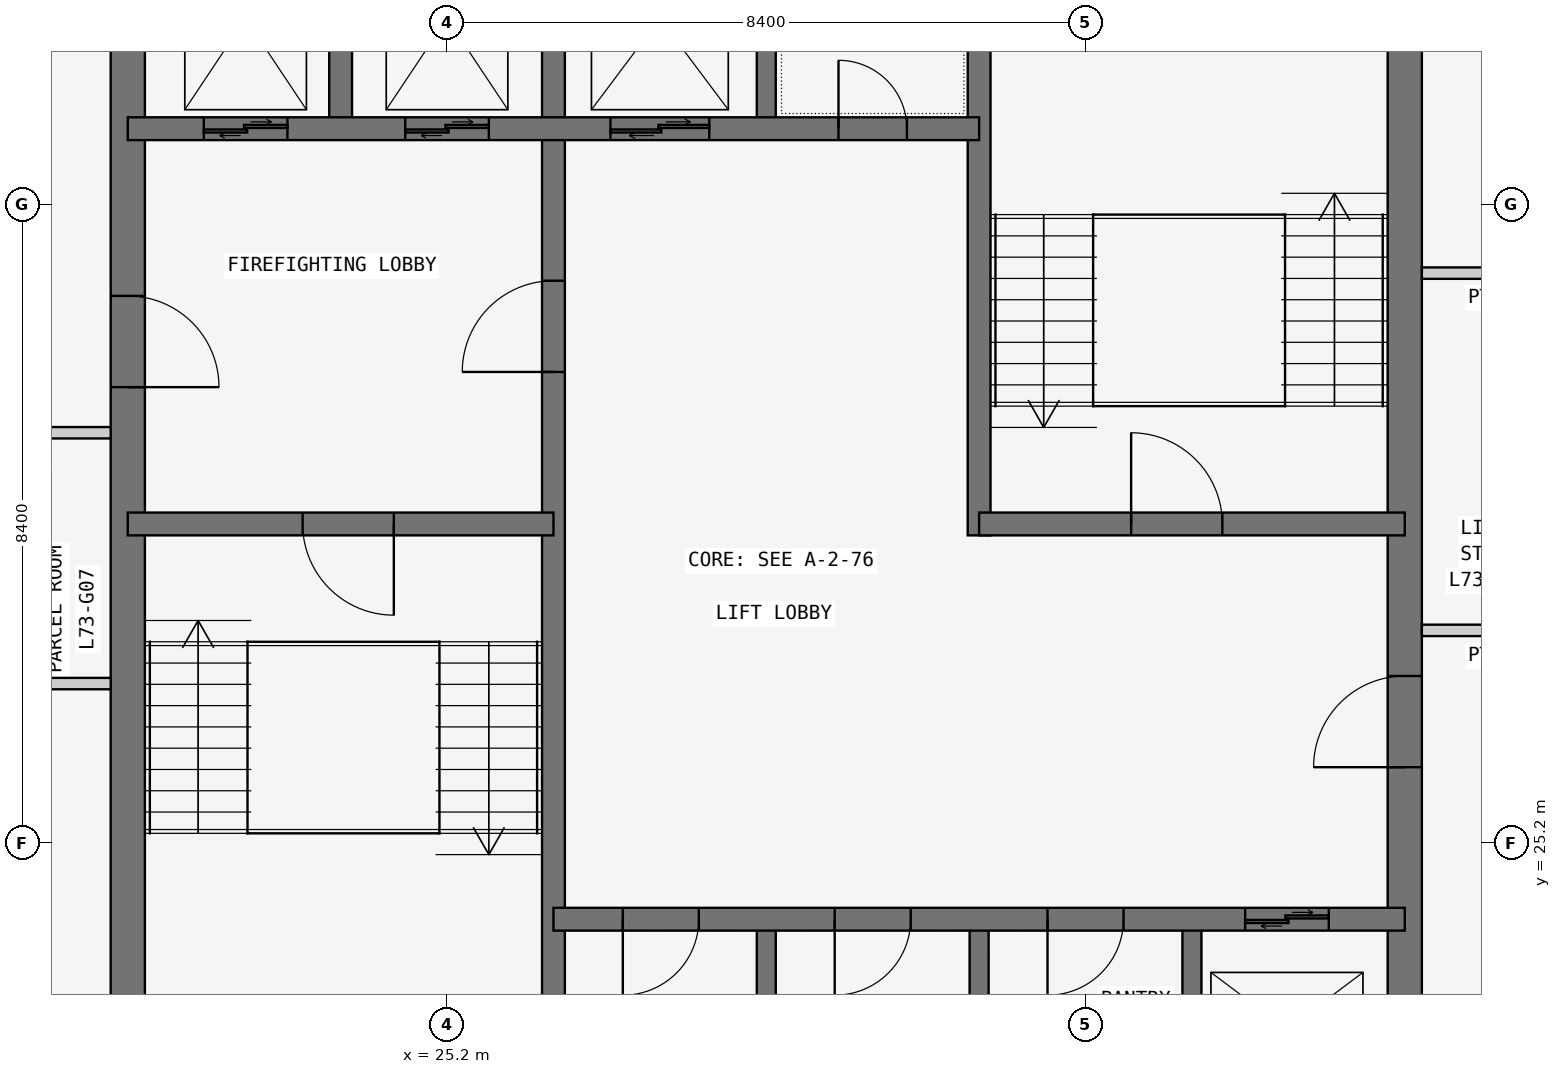
"""IFC4 building model, lengths in metres.
Left out: names, types, materials, properties, quantities, classifications, styles, units other than length and angle.
Written with IfcOpenShell. Run it as: python <this file> out.ifc"""

import sys

from ifc_helpers import new_model, si_unit, direction, frame, frame_2d, origin, place, context, subcontext, project, spatial, rectangle, extrude, element, fill, save


model = new_model("IFC4")
c1 = context("Model", 3, precision=1e-05, world=origin(), true_north=direction((0.0, 1.0)))
c2 = subcontext(c1, "Body", "Model", "MODEL_VIEW")
j1 = project(units=[si_unit("LENGTHUNIT", "METRE"), si_unit("PLANEANGLEUNIT", "RADIAN")], contexts=[c1])
p1 = place(None, origin())
s1 = spatial("IfcSite", under=j1, at=p1, CompositionType="ELEMENT")
p2 = place(p1, origin())
s2 = spatial("IfcBuilding", under=s1, at=p2, CompositionType="ELEMENT")
p3 = place(p2, frame((0.0, 0.0, 279.3)))
s3 = spatial("IfcBuildingStorey", under=s2, at=p3, CompositionType="ELEMENT", Elevation=279.3)
p4 = place(p3, frame((37.8, 21.0, 0.0), z_axis=(0.0, 0.0, 1.0), x_axis=(0.0, 1.0, 0.0)))
e1 = element("IfcWall", 1, at=p4, inside=s3, PredefinedType="SHEAR", context=c2, shape_type="SweptSolid", body=[
    extrude(rectangle(XDim=17.025, YDim=0.45, at=frame_2d((8.512, 0.0))), origin(), (0.0, 0.0, 1.0), 3.6),
])
p5 = place(p4, frame((5.2, 0.0, 0.0)))
e2 = element("IfcOpeningElement", 2, at=p5, cuts=e1, PredefinedType="OPENING", context=c2, shape_type="SweptSolid", body=[
    extrude(rectangle(XDim=1.2, YDim=2.1, at=frame_2d((0.6, 1.05))), frame((0.0, 0.235, 0.0), z_axis=(0.0, -1.0, 0.0), x_axis=(1.0, 0.0, 0.0)), (0.0, 0.0, 1.0), 0.47),
])
p6 = place(p3, frame((21.0, 37.8, 0.0), z_axis=(0.0, 0.0, 1.0), x_axis=(0.0, -1.0, 0.0)))
e3 = element("IfcWall", 3, at=p6, inside=s3, PredefinedType="SHEAR", context=c2, shape_type="SweptSolid", body=[
    extrude(rectangle(XDim=17.025, YDim=0.45, at=frame_2d((8.513, 0.0))), origin(), (0.0, 0.0, 1.0), 3.6),
])
p7 = place(p6, frame((5.4, 0.0, 0.0)))
e4 = element("IfcOpeningElement", 4, at=p7, cuts=e3, PredefinedType="OPENING", context=c2, shape_type="SweptSolid", body=[
    extrude(rectangle(XDim=1.2, YDim=2.1, at=frame_2d((0.6, 1.05))), frame((0.0, 0.235, 0.0), z_axis=(0.0, -1.0, 0.0), x_axis=(1.0, 0.0, 0.0)), (0.0, 0.0, 1.0), 0.47),
])
p8 = place(p3, frame((26.6, 21.0, 0.0), z_axis=(0.0, 0.0, 1.0), x_axis=(0.0, 1.0, 0.0)))
e5 = element("IfcWall", 5, at=p8, inside=s3, PredefinedType="SHEAR", context=c2, shape_type="SweptSolid", body=[
    extrude(rectangle(XDim=16.8, YDim=0.3, at=frame_2d((8.4, 0.0))), origin(), (0.0, 0.0, 1.0), 3.6),
])
p9 = place(p8, frame((10.4, 0.0, 0.0)))
e6 = element("IfcOpeningElement", 6, at=p9, cuts=e5, PredefinedType="OPENING", context=c2, shape_type="SweptSolid", body=[
    extrude(rectangle(XDim=1.2, YDim=2.1, at=frame_2d((0.6, 1.05))), frame((0.0, 0.16, 0.0), z_axis=(0.0, -1.0, 0.0), x_axis=(1.0, 0.0, 0.0)), (0.0, 0.0, 1.0), 0.32),
])
p10 = place(p3, frame((21.0, 29.4, 0.0), z_axis=(0.0, 0.0, 1.0), x_axis=(1.0, 0.0, 0.0)))
e7 = element("IfcWall", 7, at=p10, inside=s3, PredefinedType="SHEAR", context=c2, shape_type="SweptSolid", body=[
    extrude(rectangle(XDim=5.6, YDim=0.3, at=frame_2d((2.8, 0.0))), origin(), (0.0, 0.0, 1.0), 3.6),
])
p11 = place(p10, frame((2.3, 0.0, 0.0)))
e8 = element("IfcOpeningElement", 8, at=p11, cuts=e7, PredefinedType="OPENING", context=c2, shape_type="SweptSolid", body=[
    extrude(rectangle(XDim=1.2, YDim=2.1, at=frame_2d((0.6, 1.05))), frame((0.0, 0.16, 0.0), z_axis=(0.0, -1.0, 0.0), x_axis=(1.0, 0.0, 0.0)), (0.0, 0.0, 1.0), 0.32),
])
p12 = place(p3, frame((21.0, 34.6, 0.0), z_axis=(0.0, 0.0, 1.0), x_axis=(1.0, 0.0, 0.0)))
e9 = element("IfcWall", 9, at=p12, inside=s3, PredefinedType="SHEAR", context=c2, shape_type="SweptSolid", body=[
    extrude(rectangle(XDim=11.2, YDim=0.3, at=frame_2d((5.6, 0.0))), origin(), (0.0, 0.0, 1.0), 3.6),
])
p13 = place(p12, frame((9.35, 0.0, 0.0)))
e10 = element("IfcOpeningElement", 10, at=p13, cuts=e9, PredefinedType="OPENING", context=c2, shape_type="SweptSolid", body=[
    extrude(rectangle(XDim=0.9, YDim=2.1, at=frame_2d((0.45, 1.05))), frame((0.0, 0.16, 0.0), z_axis=(0.0, -1.0, 0.0), x_axis=(1.0, 0.0, 0.0)), (0.0, 0.0, 1.0), 0.32),
])
p14 = place(p12, frame((1.0, 0.0, 0.0)))
e11 = element("IfcOpeningElement", 11, at=p14, cuts=e9, PredefinedType="OPENING", context=c2, shape_type="SweptSolid", body=[
    extrude(rectangle(XDim=1.1, YDim=2.1, at=frame_2d((0.55, 1.05))), frame((0.0, 0.16, 0.0), z_axis=(0.0, -1.0, 0.0), x_axis=(1.0, 0.0, 0.0)), (0.0, 0.0, 1.0), 0.32),
])
p15 = place(p12, frame((3.65, 0.0, 0.0)))
e12 = element("IfcOpeningElement", 12, at=p15, cuts=e9, PredefinedType="OPENING", context=c2, shape_type="SweptSolid", body=[
    extrude(rectangle(XDim=1.1, YDim=2.1, at=frame_2d((0.55, 1.05))), frame((0.0, 0.16, 0.0), z_axis=(0.0, -1.0, 0.0), x_axis=(1.0, 0.0, 0.0)), (0.0, 0.0, 1.0), 0.32),
])
p16 = place(p12, frame((6.35, 0.0, 0.0)))
e13 = element("IfcOpeningElement", 13, at=p16, cuts=e9, PredefinedType="OPENING", context=c2, shape_type="SweptSolid", body=[
    extrude(rectangle(XDim=1.3, YDim=2.1, at=frame_2d((0.65, 1.05))), frame((0.0, 0.16, 0.0), z_axis=(0.0, -1.0, 0.0), x_axis=(1.0, 0.0, 0.0)), (0.0, 0.0, 1.0), 0.32),
])
p17 = place(p3, frame((23.8, 34.6, 0.0), z_axis=(0.0, 0.0, 1.0), x_axis=(0.0, 1.0, 0.0)))
e14 = element("IfcWall", 14, at=p17, inside=s3, PredefinedType="SHEAR", context=c2, shape_type="SweptSolid", body=[
    extrude(rectangle(XDim=3.2, YDim=0.3, at=frame_2d((1.6, 0.0))), origin(), (0.0, 0.0, 1.0), 3.6),
])
p18 = place(p3, frame((26.6, 24.2, 0.0), z_axis=(0.0, 0.0, 1.0), x_axis=(1.0, 0.0, 0.0)))
e15 = element("IfcWall", 15, at=p18, inside=s3, PredefinedType="SHEAR", context=c2, shape_type="SweptSolid", body=[
    extrude(rectangle(XDim=11.2, YDim=0.3, at=frame_2d((5.6, 0.0))), origin(), (0.0, 0.0, 1.0), 3.6),
])
p19 = place(p18, frame((0.913, 0.0, 0.0)))
e16 = element("IfcOpeningElement", 16, at=p19, cuts=e15, PredefinedType="OPENING", context=c2, shape_type="SweptSolid", body=[
    extrude(rectangle(XDim=1.0, YDim=2.1, at=frame_2d((0.5, 1.05))), frame((0.0, 0.16, 0.0), z_axis=(0.0, -1.0, 0.0), x_axis=(1.0, 0.0, 0.0)), (0.0, 0.0, 1.0), 0.32),
])
p20 = place(p18, frame((3.7, 0.0, 0.0)))
e17 = element("IfcOpeningElement", 17, at=p20, cuts=e15, PredefinedType="OPENING", context=c2, shape_type="SweptSolid", body=[
    extrude(rectangle(XDim=1.0, YDim=2.1, at=frame_2d((0.5, 1.05))), frame((0.0, 0.16, 0.0), z_axis=(0.0, -1.0, 0.0), x_axis=(1.0, 0.0, 0.0)), (0.0, 0.0, 1.0), 0.32),
])
p21 = place(p18, frame((6.5, 0.0, 0.0)))
e18 = element("IfcOpeningElement", 18, at=p21, cuts=e15, PredefinedType="OPENING", context=c2, shape_type="SweptSolid", body=[
    extrude(rectangle(XDim=1.0, YDim=2.1, at=frame_2d((0.5, 1.05))), frame((0.0, 0.16, 0.0), z_axis=(0.0, -1.0, 0.0), x_axis=(1.0, 0.0, 0.0)), (0.0, 0.0, 1.0), 0.32),
])
p22 = place(p18, frame((9.1, 0.0, 0.0)))
e19 = element("IfcOpeningElement", 19, at=p22, cuts=e15, PredefinedType="OPENING", context=c2, shape_type="SweptSolid", body=[
    extrude(rectangle(XDim=1.1, YDim=2.1, at=frame_2d((0.55, 1.05))), frame((0.0, 0.16, 0.0), z_axis=(0.0, -1.0, 0.0), x_axis=(1.0, 0.0, 0.0)), (0.0, 0.0, 1.0), 0.32),
])
p23 = place(p3, frame((32.2, 29.25, 0.0), z_axis=(0.0, 0.0, 1.0), x_axis=(0.0, 1.0, 0.0)))
e20 = element("IfcWall", 20, at=p23, inside=s3, PredefinedType="SHEAR", context=c2, shape_type="SweptSolid", body=[
    extrude(rectangle(XDim=8.55, YDim=0.3, at=frame_2d((4.275, 0.0))), origin(), (0.0, 0.0, 1.0), 3.6),
])
p24 = place(p3, frame((32.2, 29.4, 0.0), z_axis=(0.0, 0.0, 1.0), x_axis=(1.0, 0.0, 0.0)))
e21 = element("IfcWall", 21, at=p24, inside=s3, PredefinedType="SHEAR", context=c2, shape_type="SweptSolid", body=[
    extrude(rectangle(XDim=5.6, YDim=0.3, at=frame_2d((2.8, 0.0))), origin(), (0.0, 0.0, 1.0), 3.6),
])
p25 = place(p24, frame((2.0, 0.0, 0.0)))
e22 = element("IfcOpeningElement", 22, at=p25, cuts=e21, PredefinedType="OPENING", context=c2, shape_type="SweptSolid", body=[
    extrude(rectangle(XDim=1.2, YDim=2.1, at=frame_2d((0.6, 1.05))), frame((0.0, 0.16, 0.0), z_axis=(0.0, -1.0, 0.0), x_axis=(1.0, 0.0, 0.0)), (0.0, 0.0, 1.0), 0.32),
])
for number, where, z_axis, x_axis in (
    (23, (29.4, 21.0, 0.0), (0.0, 0.0, 1.0), (0.0, 1.0, 0.0)),
    (24, (32.2, 21.0, 0.0), (0.0, 0.0, 1.0), (0.0, 1.0, 0.0)),
    (25, (35.0, 21.0, 0.0), (0.0, 0.0, 1.0), (0.0, 1.0, 0.0)),
    (26, (29.4, 34.6, 0.0), (0.0, 0.0, 1.0), (0.0, 1.0, 0.0)),
):
    element("IfcWall", number, at=place(p3, frame(where, z_axis=z_axis, x_axis=x_axis)), inside=s3, PredefinedType="SHEAR", context=c2, shape_type="SweptSolid", body=[
        extrude(rectangle(XDim=3.2, YDim=0.25, at=frame_2d((1.6, 0.0))), origin(), (0.0, 0.0, 1.0), 3.6),
    ])
p26 = place(p3, frame((40.6, 23.1, 0.0), z_axis=(0.0, 0.0, 1.0), x_axis=(-1.0, 0.0, 0.0)))
e27 = element("IfcWall", 27, at=p26, inside=s3, PredefinedType="PARTITIONING", context=c2, shape_type="SweptSolid", body=[
    extrude(rectangle(XDim=2.575, YDim=0.2, at=frame_2d((1.288, 0.0))), origin(), (0.0, 0.0, 1.0), 3.45),
])
for number, where, z_axis, x_axis in (
    (28, (38.025, 28.0, 0.0), (0.0, 0.0, 1.0), (1.0, 0.0, 0.0)),
    (29, (39.85, 32.7, 0.0), (0.0, 0.0, 1.0), (-1.0, 0.0, 0.0)),
):
    element("IfcWall", number, at=place(p3, frame(where, z_axis=z_axis, x_axis=x_axis)), inside=s3, PredefinedType="PARTITIONING", context=c2, shape_type="SweptSolid", body=[
        extrude(rectangle(XDim=1.825, YDim=0.15, at=frame_2d((0.913, 0.0))), origin(), (0.0, 0.0, 1.0), 3.45),
    ])
for number, where, z_axis, x_axis in (
    (30, (20.775, 30.6, 0.0), (0.0, 0.0, 1.0), (-1.0, 0.0, 0.0)),
    (31, (18.55, 27.3, 0.0), (0.0, 0.0, 1.0), (1.0, 0.0, 0.0)),
):
    element("IfcWall", number, at=place(p3, frame(where, z_axis=z_axis, x_axis=x_axis)), inside=s3, PredefinedType="PARTITIONING", context=c2, shape_type="SweptSolid", body=[
        extrude(rectangle(XDim=2.225, YDim=0.15, at=frame_2d((1.112, 0.0))), origin(), (0.0, 0.0, 1.0), 3.45),
    ])
p27 = place(p7, origin())
e32 = element("IfcDoor", 32, at=p27, inside=s3, OperationType="SINGLE_SWING_RIGHT", PredefinedType="DOOR", context=c2, shape_type="SweptSolid", body=[
    extrude(rectangle(XDim=1.2, YDim=2.1, at=frame_2d((0.6, 1.05))), frame((0.0, 0.025, 0.0), z_axis=(0.0, -1.0, 0.0), x_axis=(1.0, 0.0, 0.0)), (0.0, 0.0, 1.0), 0.05),
])
fill(e4, e32)
p28 = place(p11, frame((1.2, 0.0, 0.0), z_axis=(0.0, 0.0, 1.0), x_axis=(-1.0, 0.0, 0.0)))
e33 = element("IfcDoor", 33, at=p28, inside=s3, OperationType="SINGLE_SWING_LEFT", PredefinedType="DOOR", context=c2, shape_type="SweptSolid", body=[
    extrude(rectangle(XDim=1.2, YDim=2.1, at=frame_2d((0.6, 1.05))), frame((0.0, 0.025, 0.0), z_axis=(0.0, -1.0, 0.0), x_axis=(1.0, 0.0, 0.0)), (0.0, 0.0, 1.0), 0.05),
])
fill(e8, e33)
p29 = place(p9, origin())
e34 = element("IfcDoor", 34, at=p29, inside=s3, OperationType="SINGLE_SWING_LEFT", PredefinedType="DOOR", context=c2, shape_type="SweptSolid", body=[
    extrude(rectangle(XDim=1.2, YDim=2.1, at=frame_2d((0.6, 1.05))), frame((0.0, 0.025, 0.0), z_axis=(0.0, -1.0, 0.0), x_axis=(1.0, 0.0, 0.0)), (0.0, 0.0, 1.0), 0.05),
])
fill(e6, e34)
p30 = place(p5, origin())
e35 = element("IfcDoor", 35, at=p30, inside=s3, OperationType="SINGLE_SWING_LEFT", PredefinedType="DOOR", context=c2, shape_type="SweptSolid", body=[
    extrude(rectangle(XDim=1.2, YDim=2.1, at=frame_2d((0.6, 1.05))), frame((0.0, 0.025, 0.0), z_axis=(0.0, -1.0, 0.0), x_axis=(1.0, 0.0, 0.0)), (0.0, 0.0, 1.0), 0.05),
])
fill(e2, e35)
p31 = place(p25, origin())
e36 = element("IfcDoor", 36, at=p31, inside=s3, OperationType="SINGLE_SWING_LEFT", PredefinedType="DOOR", context=c2, shape_type="SweptSolid", body=[
    extrude(rectangle(XDim=1.2, YDim=2.1, at=frame_2d((0.6, 1.05))), frame((0.0, 0.025, 0.0), z_axis=(0.0, -1.0, 0.0), x_axis=(1.0, 0.0, 0.0)), (0.0, 0.0, 1.0), 0.05),
])
fill(e22, e36)
p32 = place(p13, origin())
e37 = element("IfcDoor", 37, at=p32, inside=s3, OperationType="SINGLE_SWING_LEFT", PredefinedType="DOOR", context=c2, shape_type="SweptSolid", body=[
    extrude(rectangle(XDim=0.9, YDim=2.1, at=frame_2d((0.45, 1.05))), frame((0.0, 0.025, 0.0), z_axis=(0.0, -1.0, 0.0), x_axis=(1.0, 0.0, 0.0)), (0.0, 0.0, 1.0), 0.05),
])
fill(e10, e37)
p33 = place(p19, frame((1.0, 0.0, 0.0), z_axis=(0.0, 0.0, 1.0), x_axis=(-1.0, 0.0, 0.0)))
e38 = element("IfcDoor", 38, at=p33, inside=s3, OperationType="SINGLE_SWING_RIGHT", PredefinedType="DOOR", context=c2, shape_type="SweptSolid", body=[
    extrude(rectangle(XDim=1.0, YDim=2.1, at=frame_2d((0.5, 1.05))), frame((0.0, 0.025, 0.0), z_axis=(0.0, -1.0, 0.0), x_axis=(1.0, 0.0, 0.0)), (0.0, 0.0, 1.0), 0.05),
])
fill(e16, e38)
p34 = place(p20, frame((1.0, 0.0, 0.0), z_axis=(0.0, 0.0, 1.0), x_axis=(-1.0, 0.0, 0.0)))
e39 = element("IfcDoor", 39, at=p34, inside=s3, OperationType="SINGLE_SWING_RIGHT", PredefinedType="DOOR", context=c2, shape_type="SweptSolid", body=[
    extrude(rectangle(XDim=1.0, YDim=2.1, at=frame_2d((0.5, 1.05))), frame((0.0, 0.025, 0.0), z_axis=(0.0, -1.0, 0.0), x_axis=(1.0, 0.0, 0.0)), (0.0, 0.0, 1.0), 0.05),
])
fill(e17, e39)
p35 = place(p21, frame((1.0, 0.0, 0.0), z_axis=(0.0, 0.0, 1.0), x_axis=(-1.0, 0.0, 0.0)))
e40 = element("IfcDoor", 40, at=p35, inside=s3, OperationType="SINGLE_SWING_RIGHT", PredefinedType="DOOR", context=c2, shape_type="SweptSolid", body=[
    extrude(rectangle(XDim=1.0, YDim=2.1, at=frame_2d((0.5, 1.05))), frame((0.0, 0.025, 0.0), z_axis=(0.0, -1.0, 0.0), x_axis=(1.0, 0.0, 0.0)), (0.0, 0.0, 1.0), 0.05),
])
fill(e18, e40)
p36 = place(p22, origin())
e41 = element("IfcDoor", 41, at=p36, inside=s3, OperationType="DOUBLE_DOOR_SLIDING", PredefinedType="DOOR", context=c2, shape_type="SweptSolid", body=[
    extrude(rectangle(XDim=1.1, YDim=2.1, at=frame_2d((0.55, 1.05))), frame((0.0, 0.025, 0.0), z_axis=(0.0, -1.0, 0.0), x_axis=(1.0, 0.0, 0.0)), (0.0, 0.0, 1.0), 0.05),
])
fill(e19, e41)
p37 = place(p14, origin())
e42 = element("IfcDoor", 42, at=p37, inside=s3, OperationType="DOUBLE_DOOR_SLIDING", PredefinedType="DOOR", context=c2, shape_type="SweptSolid", body=[
    extrude(rectangle(XDim=1.1, YDim=2.1, at=frame_2d((0.55, 1.05))), frame((0.0, 0.025, 0.0), z_axis=(0.0, -1.0, 0.0), x_axis=(1.0, 0.0, 0.0)), (0.0, 0.0, 1.0), 0.05),
])
fill(e11, e42)
p38 = place(p15, origin())
e43 = element("IfcDoor", 43, at=p38, inside=s3, OperationType="DOUBLE_DOOR_SLIDING", PredefinedType="DOOR", context=c2, shape_type="SweptSolid", body=[
    extrude(rectangle(XDim=1.1, YDim=2.1, at=frame_2d((0.55, 1.05))), frame((0.0, 0.025, 0.0), z_axis=(0.0, -1.0, 0.0), x_axis=(1.0, 0.0, 0.0)), (0.0, 0.0, 1.0), 0.05),
])
fill(e12, e43)
p39 = place(p16, origin())
e44 = element("IfcDoor", 44, at=p39, inside=s3, OperationType="DOUBLE_DOOR_SLIDING", PredefinedType="DOOR", context=c2, shape_type="SweptSolid", body=[
    extrude(rectangle(XDim=1.3, YDim=2.1, at=frame_2d((0.65, 1.05))), frame((0.0, 0.025, 0.0), z_axis=(0.0, -1.0, 0.0), x_axis=(1.0, 0.0, 0.0)), (0.0, 0.0, 1.0), 0.05),
])
fill(e13, e44)
save(model, sys.argv[1])
